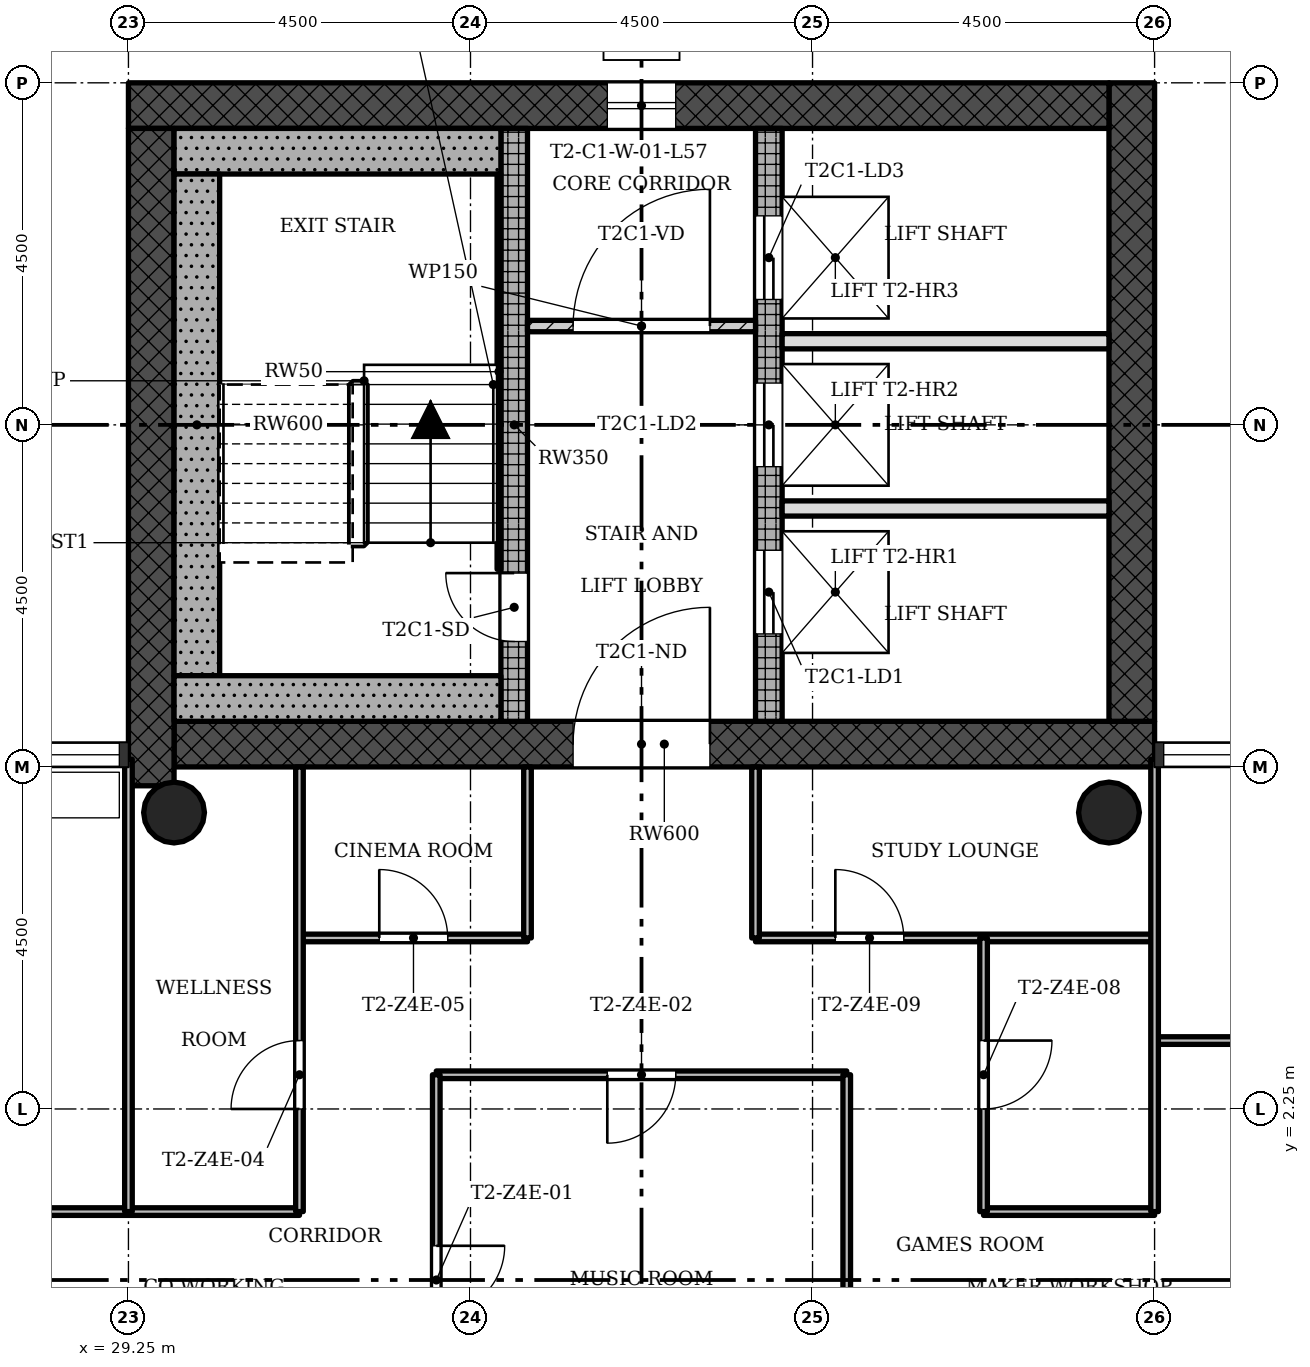
"""IFC4 building model, lengths in metres.
Left out: names, types, materials, properties, quantities, classifications, styles, units other than length and angle.
Written with IfcOpenShell. Run it as: python <this file> out.ifc"""

import sys

from ifc_helpers import new_model, si_unit, direction, frame, frame_2d, origin, origin_2d, place, context, subcontext, project, spatial, rectangle, hollow_circle, extrude, element, fill, save


model = new_model("IFC4")
c1 = context("Model", 3, precision=1e-05, world=origin(), true_north=direction((0.0, 1.0)))
c2 = subcontext(c1, "Body", "Model", "MODEL_VIEW")
j1 = project(units=[si_unit("LENGTHUNIT", "METRE"), si_unit("PLANEANGLEUNIT", "RADIAN")], contexts=[c1])
p1 = place(None, origin())
s1 = spatial("IfcSite", under=j1, at=p1, CompositionType="ELEMENT")
p2 = place(p1, origin())
s2 = spatial("IfcBuilding", under=s1, at=p2, CompositionType="ELEMENT")
p3 = place(p2, frame((0.0, 0.0, 206.2)))
s3 = spatial("IfcBuildingStorey", under=s2, at=p3, CompositionType="ELEMENT", Elevation=206.2)
p4 = place(p3, frame((29.85, 7.05, 0.0), z_axis=(0.0, 0.0, 1.0), x_axis=(1.0, 0.0, 0.0)))
e1 = element("IfcWall", 1, at=p4, inside=s3, PredefinedType="SHEAR", context=c2, shape_type="SweptSolid", body=[
    extrude(rectangle(XDim=12.9, YDim=0.6, at=frame_2d((6.45, 0.0))), origin(), (0.0, 0.0, 1.0), 3.4),
])
p5 = place(p4, frame((5.25, 0.0, 0.0)))
e2 = element("IfcOpeningElement", 2, at=p5, cuts=e1, PredefinedType="OPENING", context=c2, shape_type="SweptSolid", body=[
    extrude(rectangle(XDim=1.8, YDim=2.1, at=frame_2d((0.9, 1.05))), frame((0.0, 0.31, 0.0), z_axis=(0.0, -1.0, 0.0), x_axis=(1.0, 0.0, 0.0)), (0.0, 0.0, 1.0), 0.62),
])
p6 = place(p3, frame((42.45, 7.35, 0.0), z_axis=(0.0, 0.0, 1.0), x_axis=(0.0, 1.0, 0.0)))
e3 = element("IfcWall", 3, at=p6, inside=s3, PredefinedType="SHEAR", context=c2, shape_type="SweptSolid", body=[
    extrude(rectangle(XDim=8.4, YDim=0.6, at=frame_2d((4.2, 0.0))), origin(), (0.0, 0.0, 1.0), 3.4),
])
p7 = place(p3, frame((42.15, 15.45, 0.0), z_axis=(0.0, 0.0, 1.0), x_axis=(-1.0, 0.0, 0.0)))
e4 = element("IfcWall", 4, at=p7, inside=s3, PredefinedType="SHEAR", context=c2, shape_type="SweptSolid", body=[
    extrude(rectangle(XDim=12.9, YDim=0.6, at=frame_2d((6.45, 0.0))), origin(), (0.0, 0.0, 1.0), 3.4),
])
p8 = place(p7, frame((5.7, 0.0, 0.45)))
e5 = element("IfcOpeningElement", 5, at=p8, cuts=e4, PredefinedType="OPENING", context=c2, shape_type="SweptSolid", body=[
    extrude(rectangle(XDim=0.9, YDim=2.4, at=frame_2d((0.45, 1.2))), frame((0.0, 0.31, 0.0), z_axis=(0.0, -1.0, 0.0), x_axis=(1.0, 0.0, 0.0)), (0.0, 0.0, 1.0), 0.62),
])
p9 = place(p3, frame((29.55, 15.15, 0.0), z_axis=(0.0, 0.0, 1.0), x_axis=(0.0, -1.0, 0.0)))
e6 = element("IfcWall", 6, at=p9, inside=s3, PredefinedType="SHEAR", context=c2, shape_type="SweptSolid", body=[
    extrude(rectangle(XDim=8.648, YDim=0.6, at=frame_2d((4.324, 0.0))), origin(), (0.0, 0.0, 1.0), 3.4),
])
p10 = place(p3, frame((34.325, 7.35, 0.0), z_axis=(0.0, 0.0, 1.0), x_axis=(0.0, 1.0, 0.0)))
e7 = element("IfcWall", 7, at=p10, inside=s3, PredefinedType="SHEAR", context=c2, shape_type="SweptSolid", body=[
    extrude(rectangle(XDim=7.8, YDim=0.35, at=frame_2d((3.9, 0.0))), origin(), (0.0, 0.0, 1.0), 3.4),
])
p11 = place(p10, frame((1.05, 0.0, 0.0)))
e8 = element("IfcOpeningElement", 8, at=p11, cuts=e7, PredefinedType="OPENING", context=c2, shape_type="SweptSolid", body=[
    extrude(rectangle(XDim=0.9, YDim=2.1, at=frame_2d((0.45, 1.05))), frame((0.0, 0.185, 0.0), z_axis=(0.0, -1.0, 0.0), x_axis=(1.0, 0.0, 0.0)), (0.0, 0.0, 1.0), 0.37),
])
p12 = place(p3, frame((37.675, 7.35, 0.0), z_axis=(0.0, 0.0, 1.0), x_axis=(0.0, 1.0, 0.0)))
e9 = element("IfcWall", 9, at=p12, inside=s3, PredefinedType="SHEAR", context=c2, shape_type="SweptSolid", body=[
    extrude(rectangle(XDim=7.8, YDim=0.35, at=frame_2d((3.9, 0.0))), origin(), (0.0, 0.0, 1.0), 3.4),
])
p13 = place(p12, frame((1.15, 0.0, 0.0)))
e10 = element("IfcOpeningElement", 10, at=p13, cuts=e9, PredefinedType="OPENING", context=c2, shape_type="SweptSolid", body=[
    extrude(rectangle(XDim=1.1, YDim=2.1, at=frame_2d((0.55, 1.05))), frame((0.0, 0.185, 0.0), z_axis=(0.0, -1.0, 0.0), x_axis=(1.0, 0.0, 0.0)), (0.0, 0.0, 1.0), 0.37),
])
p14 = place(p12, frame((3.35, 0.0, 0.0)))
e11 = element("IfcOpeningElement", 11, at=p14, cuts=e9, PredefinedType="OPENING", context=c2, shape_type="SweptSolid", body=[
    extrude(rectangle(XDim=1.1, YDim=2.1, at=frame_2d((0.55, 1.05))), frame((0.0, 0.185, 0.0), z_axis=(0.0, -1.0, 0.0), x_axis=(1.0, 0.0, 0.0)), (0.0, 0.0, 1.0), 0.37),
])
p15 = place(p12, frame((5.55, 0.0, 0.0)))
e12 = element("IfcOpeningElement", 12, at=p15, cuts=e9, PredefinedType="OPENING", context=c2, shape_type="SweptSolid", body=[
    extrude(rectangle(XDim=1.1, YDim=2.1, at=frame_2d((0.55, 1.05))), frame((0.0, 0.185, 0.0), z_axis=(0.0, -1.0, 0.0), x_axis=(1.0, 0.0, 0.0)), (0.0, 0.0, 1.0), 0.37),
])
for number, where, z_axis, x_axis in (
    (13, (42.15, 6.15, 0.0), (0.0, 0.0, 1.0), (1.0, 0.0, 0.0)),
    (14, (29.85, 6.15, 0.0), (0.0, 0.0, 1.0), (1.0, 0.0, 0.0)),
):
    element("IfcColumn", number, at=place(p3, frame(where, z_axis=z_axis, x_axis=x_axis)), inside=s3, PredefinedType="COLUMN", context=c2, shape_type="SweptSolid", body=[
        extrude(hollow_circle(Radius=0.4, WallThickness=0.028, at=origin_2d()), origin(), (0.0, 0.0, 1.0), 3.4),
    ])
p16 = place(p3, frame((37.5, 12.55, 0.0), z_axis=(0.0, 0.0, 1.0), x_axis=(-1.0, 0.0, 0.0)))
e15 = element("IfcWall", 15, at=p16, inside=s3, PredefinedType="PARTITIONING", context=c2, shape_type="SweptSolid", body=[
    extrude(rectangle(XDim=3.0, YDim=0.15, at=frame_2d((1.5, 0.0))), origin(), (0.0, 0.0, 1.0), 3.0),
])
p17 = place(p16, frame((0.6, 0.0, 0.0)))
e16 = element("IfcOpeningElement", 16, at=p17, cuts=e15, PredefinedType="OPENING", context=c2, shape_type="SweptSolid", body=[
    extrude(rectangle(XDim=1.8, YDim=2.1, at=frame_2d((0.9, 1.05))), frame((0.0, 0.085, 0.0), z_axis=(0.0, -1.0, 0.0), x_axis=(1.0, 0.0, 0.0)), (0.0, 0.0, 1.0), 0.17),
])
for number, where, z_axis, x_axis in (
    (17, (42.15, 10.15, 0.0), (0.0, 0.0, 1.0), (-1.0, 0.0, 0.0)),
    (18, (42.15, 12.35, 0.0), (0.0, 0.0, 1.0), (-1.0, 0.0, 0.0)),
):
    element("IfcWall", number, at=place(p3, frame(where, z_axis=z_axis, x_axis=x_axis)), inside=s3, PredefinedType="SOLIDWALL", context=c2, shape_type="SweptSolid", body=[
        extrude(rectangle(XDim=4.3, YDim=0.2, at=frame_2d((2.15, 0.0))), origin(), (0.0, 0.0, 1.0), 3.0),
    ])
p18 = place(p3, frame((42.75, 0.9, 0.0), z_axis=(0.0, 0.0, 1.0), x_axis=(-1.0, 0.0, 0.0)))
e19 = element("IfcWall", 19, at=p18, inside=s3, PredefinedType="PARTITIONING", context=c2, shape_type="SweptSolid", body=[
    extrude(rectangle(XDim=2.25, YDim=0.1, at=frame_2d((1.125, 0.0))), origin(), (0.0, 0.0, 1.0), 3.0),
])
p19 = place(p3, frame((31.5, 0.9, 0.0), z_axis=(0.0, 0.0, 1.0), x_axis=(-1.0, 0.0, 0.0)))
e20 = element("IfcWall", 20, at=p19, inside=s3, PredefinedType="PARTITIONING", context=c2, shape_type="SweptSolid", body=[
    extrude(rectangle(XDim=6.75, YDim=0.1, at=frame_2d((3.375, 0.0))), origin(), (0.0, 0.0, 1.0), 3.0),
])
p20 = place(p19, frame((4.05, 0.0, 0.0)))
e21 = element("IfcOpeningElement", 21, at=p20, cuts=e20, PredefinedType="OPENING", context=c2, shape_type="SweptSolid", body=[
    extrude(rectangle(XDim=0.9, YDim=2.1, at=frame_2d((0.45, 1.05))), frame((0.0, 0.06, 0.0), z_axis=(0.0, -1.0, 0.0), x_axis=(1.0, 0.0, 0.0)), (0.0, 0.0, 1.0), 0.12),
])
p21 = place(p3, frame((38.7, 2.7, 0.0), z_axis=(0.0, 0.0, 1.0), x_axis=(-1.0, 0.0, 0.0)))
e22 = element("IfcWall", 22, at=p21, inside=s3, PredefinedType="PARTITIONING", context=c2, shape_type="SweptSolid", body=[
    extrude(rectangle(XDim=5.4, YDim=0.1, at=frame_2d((2.7, 0.0))), origin(), (0.0, 0.0, 1.0), 3.0),
])
p22 = place(p21, frame((2.25, 0.0, 0.0)))
e23 = element("IfcOpeningElement", 23, at=p22, cuts=e22, PredefinedType="OPENING", context=c2, shape_type="SweptSolid", body=[
    extrude(rectangle(XDim=0.9, YDim=2.1, at=frame_2d((0.45, 1.05))), frame((0.0, 0.06, 0.0), z_axis=(0.0, -1.0, 0.0), x_axis=(1.0, 0.0, 0.0)), (0.0, 0.0, 1.0), 0.12),
])
p23 = place(p3, frame((47.25, 3.15, 0.0), z_axis=(0.0, 0.0, 1.0), x_axis=(-1.0, 0.0, 0.0)))
e24 = element("IfcWall", 24, at=p23, inside=s3, PredefinedType="PARTITIONING", context=c2, shape_type="SweptSolid", body=[
    extrude(rectangle(XDim=4.5, YDim=0.1, at=frame_2d((2.25, 0.0))), origin(), (0.0, 0.0, 1.0), 3.0),
])
p24 = place(p23, frame((1.8, 0.0, 0.0)))
e25 = element("IfcOpeningElement", 25, at=p24, cuts=e24, PredefinedType="OPENING", context=c2, shape_type="SweptSolid", body=[
    extrude(rectangle(XDim=0.9, YDim=2.1, at=frame_2d((0.45, 1.05))), frame((0.0, 0.06, 0.0), z_axis=(0.0, -1.0, 0.0), x_axis=(1.0, 0.0, 0.0)), (0.0, 0.0, 1.0), 0.12),
])
p25 = place(p3, frame((42.75, 4.5, 0.0), z_axis=(0.0, 0.0, 1.0), x_axis=(-1.0, 0.0, 0.0)))
e26 = element("IfcWall", 26, at=p25, inside=s3, PredefinedType="PARTITIONING", context=c2, shape_type="SweptSolid", body=[
    extrude(rectangle(XDim=5.25, YDim=0.1, at=frame_2d((2.625, 0.0))), origin(), (0.0, 0.0, 1.0), 3.0),
])
p26 = place(p25, frame((3.3, 0.0, 0.0)))
e27 = element("IfcOpeningElement", 27, at=p26, cuts=e26, PredefinedType="OPENING", context=c2, shape_type="SweptSolid", body=[
    extrude(rectangle(XDim=0.9, YDim=2.1, at=frame_2d((0.45, 1.05))), frame((0.0, 0.06, 0.0), z_axis=(0.0, -1.0, 0.0), x_axis=(1.0, 0.0, 0.0)), (0.0, 0.0, 1.0), 0.12),
])
p27 = place(p3, frame((34.5, 4.5, 0.0), z_axis=(0.0, 0.0, 1.0), x_axis=(-1.0, 0.0, 0.0)))
e28 = element("IfcWall", 28, at=p27, inside=s3, PredefinedType="PARTITIONING", context=c2, shape_type="SweptSolid", body=[
    extrude(rectangle(XDim=3.0, YDim=0.1, at=frame_2d((1.5, 0.0))), origin(), (0.0, 0.0, 1.0), 3.0),
])
p28 = place(p27, frame((1.05, 0.0, 0.0)))
e29 = element("IfcOpeningElement", 29, at=p28, cuts=e28, PredefinedType="OPENING", context=c2, shape_type="SweptSolid", body=[
    extrude(rectangle(XDim=0.9, YDim=2.1, at=frame_2d((0.45, 1.05))), frame((0.0, 0.06, 0.0), z_axis=(0.0, -1.0, 0.0), x_axis=(1.0, 0.0, 0.0)), (0.0, 0.0, 1.0), 0.12),
])
p29 = place(p3, frame((42.75, 0.9, 0.0), z_axis=(0.0, 0.0, 1.0), x_axis=(0.0, 1.0, 0.0)))
e30 = element("IfcWall", 30, at=p29, inside=s3, PredefinedType="PARTITIONING", context=c2, shape_type="SweptSolid", body=[
    extrude(rectangle(XDim=5.95, YDim=0.1, at=frame_2d((2.975, 0.0))), origin(), (0.0, 0.0, 1.0), 3.0),
])
p30 = place(p3, frame((40.5, 0.9, 0.0), z_axis=(0.0, 0.0, 1.0), x_axis=(0.0, 1.0, 0.0)))
e31 = element("IfcWall", 31, at=p30, inside=s3, PredefinedType="PARTITIONING", context=c2, shape_type="SweptSolid", body=[
    extrude(rectangle(XDim=3.6, YDim=0.1, at=frame_2d((1.8, 0.0))), origin(), (0.0, 0.0, 1.0), 3.0),
])
p31 = place(p30, frame((1.35, 0.0, 0.0)))
e32 = element("IfcOpeningElement", 32, at=p31, cuts=e31, PredefinedType="OPENING", context=c2, shape_type="SweptSolid", body=[
    extrude(rectangle(XDim=0.9, YDim=2.1, at=frame_2d((0.45, 1.05))), frame((0.0, 0.06, 0.0), z_axis=(0.0, -1.0, 0.0), x_axis=(1.0, 0.0, 0.0)), (0.0, 0.0, 1.0), 0.12),
])
p32 = place(p3, frame((38.7, -2.7, 0.0), z_axis=(0.0, 0.0, 1.0), x_axis=(0.0, 1.0, 0.0)))
e33 = element("IfcWall", 33, at=p32, inside=s3, PredefinedType="PARTITIONING", context=c2, shape_type="SweptSolid", body=[
    extrude(rectangle(XDim=5.4, YDim=0.1, at=frame_2d((2.7, 0.0))), origin(), (0.0, 0.0, 1.0), 3.0),
])
for number, where, z_axis, x_axis in (
    (34, (37.5, 4.5, 0.0), (0.0, 0.0, 1.0), (0.0, 1.0, 0.0)),
    (35, (34.5, 4.5, 0.0), (0.0, 0.0, 1.0), (0.0, 1.0, 0.0)),
):
    element("IfcWall", number, at=place(p3, frame(where, z_axis=z_axis, x_axis=x_axis)), inside=s3, PredefinedType="PARTITIONING", context=c2, shape_type="SweptSolid", body=[
        extrude(rectangle(XDim=2.25, YDim=0.1, at=frame_2d((1.125, 0.0))), origin(), (0.0, 0.0, 1.0), 3.0),
    ])
p33 = place(p3, frame((33.3, -2.7, 0.0), z_axis=(0.0, 0.0, 1.0), x_axis=(0.0, 1.0, 0.0)))
e36 = element("IfcWall", 36, at=p33, inside=s3, PredefinedType="PARTITIONING", context=c2, shape_type="SweptSolid", body=[
    extrude(rectangle(XDim=5.4, YDim=0.1, at=frame_2d((2.7, 0.0))), origin(), (0.0, 0.0, 1.0), 3.0),
])
p34 = place(p33, frame((2.25, 0.0, 0.0)))
e37 = element("IfcOpeningElement", 37, at=p34, cuts=e36, PredefinedType="OPENING", context=c2, shape_type="SweptSolid", body=[
    extrude(rectangle(XDim=0.9, YDim=2.1, at=frame_2d((0.45, 1.05))), frame((0.0, 0.06, 0.0), z_axis=(0.0, -1.0, 0.0), x_axis=(1.0, 0.0, 0.0)), (0.0, 0.0, 1.0), 0.12),
])
p35 = place(p3, frame((31.5, 0.9, 0.0), z_axis=(0.0, 0.0, 1.0), x_axis=(0.0, 1.0, 0.0)))
e38 = element("IfcWall", 38, at=p35, inside=s3, PredefinedType="PARTITIONING", context=c2, shape_type="SweptSolid", body=[
    extrude(rectangle(XDim=5.85, YDim=0.1, at=frame_2d((2.925, 0.0))), origin(), (0.0, 0.0, 1.0), 3.0),
])
p36 = place(p35, frame((1.35, 0.0, 0.0)))
e39 = element("IfcOpeningElement", 39, at=p36, cuts=e38, PredefinedType="OPENING", context=c2, shape_type="SweptSolid", body=[
    extrude(rectangle(XDim=0.9, YDim=2.1, at=frame_2d((0.45, 1.05))), frame((0.0, 0.06, 0.0), z_axis=(0.0, -1.0, 0.0), x_axis=(1.0, 0.0, 0.0)), (0.0, 0.0, 1.0), 0.12),
])
p37 = place(p3, frame((29.25, 0.9, 0.0), z_axis=(0.0, 0.0, 1.0), x_axis=(0.0, 1.0, 0.0)))
e40 = element("IfcWall", 40, at=p37, inside=s3, PredefinedType="PARTITIONING", context=c2, shape_type="SweptSolid", body=[
    extrude(rectangle(XDim=5.95, YDim=0.1, at=frame_2d((2.975, 0.0))), origin(), (0.0, 0.0, 1.0), 3.0),
])
p38 = place(p3, frame((34.15, 14.85, 0.0), z_axis=(0.0, 0.0, 1.0), x_axis=(-1.0, 0.0, 0.0)))
e41 = element("IfcWall", 41, at=p38, inside=s3, PredefinedType="SHEAR", context=c2, shape_type="SweptSolid", body=[
    extrude(rectangle(XDim=4.3, YDim=0.6, at=frame_2d((2.15, 0.0))), origin(), (0.0, 0.0, 1.0), 3.4),
])
p39 = place(p3, frame((30.15, 7.95, 0.0), z_axis=(0.0, 0.0, 1.0), x_axis=(0.0, 1.0, 0.0)))
e42 = element("IfcWall", 42, at=p39, inside=s3, PredefinedType="SHEAR", context=c2, shape_type="SweptSolid", body=[
    extrude(rectangle(XDim=6.6, YDim=0.6, at=frame_2d((3.3, 0.0))), origin(), (0.0, 0.0, 1.0), 3.4),
])
p40 = place(p3, frame((34.15, 7.65, 0.0), z_axis=(0.0, 0.0, 1.0), x_axis=(-1.0, 0.0, 0.0)))
e43 = element("IfcWall", 43, at=p40, inside=s3, PredefinedType="SHEAR", context=c2, shape_type="SweptSolid", body=[
    extrude(rectangle(XDim=4.3, YDim=0.6, at=frame_2d((2.15, 0.0))), origin(), (0.0, 0.0, 1.0), 3.4),
])
p41 = place(p3, frame((34.125, 9.35, 0.0), z_axis=(0.0, 0.0, 1.0), x_axis=(0.0, 1.0, 0.0)))
e44 = element("IfcWall", 44, at=p41, inside=s3, PredefinedType="SHEAR", context=c2, shape_type="SweptSolid", body=[
    extrude(rectangle(XDim=5.2, YDim=0.05, at=frame_2d((2.6, 0.0))), origin(), (0.0, 0.0, 1.0), 3.4),
])
p42 = place(p8, origin())
e45 = element("IfcWindow", 45, at=p42, inside=s3, PartitioningType="SINGLE_PANEL", PredefinedType="WINDOW", context=c2, shape_type="SweptSolid", body=[
    extrude(rectangle(XDim=0.9, YDim=2.4, at=frame_2d((0.45, 1.2))), frame((0.0, 0.03, 0.0), z_axis=(0.0, -1.0, 0.0), x_axis=(1.0, 0.0, 0.0)), (0.0, 0.0, 1.0), 0.06),
])
fill(e5, e45)
p43 = place(p17, origin())
e46 = element("IfcDoor", 46, at=p43, inside=s3, OperationType="SINGLE_SWING_LEFT", PredefinedType="DOOR", context=c2, shape_type="SweptSolid", body=[
    extrude(rectangle(XDim=1.8, YDim=2.1, at=frame_2d((0.9, 1.05))), frame((0.0, 0.025, 0.0), z_axis=(0.0, -1.0, 0.0), x_axis=(1.0, 0.0, 0.0)), (0.0, 0.0, 1.0), 0.05),
])
fill(e16, e46)
p44 = place(p34, origin())
e47 = element("IfcDoor", 47, at=p44, inside=s3, OperationType="SINGLE_SWING_RIGHT", PredefinedType="DOOR", context=c2, shape_type="SweptSolid", body=[
    extrude(rectangle(XDim=0.9, YDim=2.1, at=frame_2d((0.45, 1.05))), frame((0.0, 0.025, 0.0), z_axis=(0.0, -1.0, 0.0), x_axis=(1.0, 0.0, 0.0)), (0.0, 0.0, 1.0), 0.05),
])
fill(e37, e47)
p45 = place(p22, origin())
e48 = element("IfcDoor", 48, at=p45, inside=s3, OperationType="SINGLE_SWING_LEFT", PredefinedType="DOOR", context=c2, shape_type="SweptSolid", body=[
    extrude(rectangle(XDim=0.9, YDim=2.1, at=frame_2d((0.45, 1.05))), frame((0.0, 0.025, 0.0), z_axis=(0.0, -1.0, 0.0), x_axis=(1.0, 0.0, 0.0)), (0.0, 0.0, 1.0), 0.05),
])
fill(e23, e48)
p46 = place(p36, origin())
e49 = element("IfcDoor", 49, at=p46, inside=s3, OperationType="SINGLE_SWING_RIGHT", PredefinedType="DOOR", context=c2, shape_type="SweptSolid", body=[
    extrude(rectangle(XDim=0.9, YDim=2.1, at=frame_2d((0.45, 1.05))), frame((0.0, 0.025, 0.0), z_axis=(0.0, -1.0, 0.0), x_axis=(1.0, 0.0, 0.0)), (0.0, 0.0, 1.0), 0.05),
])
fill(e39, e49)
p47 = place(p28, origin())
e50 = element("IfcDoor", 50, at=p47, inside=s3, OperationType="SINGLE_SWING_RIGHT", PredefinedType="DOOR", context=c2, shape_type="SweptSolid", body=[
    extrude(rectangle(XDim=0.9, YDim=2.1, at=frame_2d((0.45, 1.05))), frame((0.0, 0.025, 0.0), z_axis=(0.0, -1.0, 0.0), x_axis=(1.0, 0.0, 0.0)), (0.0, 0.0, 1.0), 0.05),
])
fill(e29, e50)
p48 = place(p31, origin())
e51 = element("IfcDoor", 51, at=p48, inside=s3, OperationType="SINGLE_SWING_RIGHT", PredefinedType="DOOR", context=c2, shape_type="SweptSolid", body=[
    extrude(rectangle(XDim=0.9, YDim=2.1, at=frame_2d((0.45, 1.05))), frame((0.0, 0.025, 0.0), z_axis=(0.0, -1.0, 0.0), x_axis=(1.0, 0.0, 0.0)), (0.0, 0.0, 1.0), 0.05),
])
fill(e32, e51)
p49 = place(p26, origin())
e52 = element("IfcDoor", 52, at=p49, inside=s3, OperationType="SINGLE_SWING_RIGHT", PredefinedType="DOOR", context=c2, shape_type="SweptSolid", body=[
    extrude(rectangle(XDim=0.9, YDim=2.1, at=frame_2d((0.45, 1.05))), frame((0.0, 0.025, 0.0), z_axis=(0.0, -1.0, 0.0), x_axis=(1.0, 0.0, 0.0)), (0.0, 0.0, 1.0), 0.05),
])
fill(e27, e52)
p50 = place(p11, origin())
e53 = element("IfcDoor", 53, at=p50, inside=s3, OperationType="SINGLE_SWING_LEFT", PredefinedType="DOOR", context=c2, shape_type="SweptSolid", body=[
    extrude(rectangle(XDim=0.9, YDim=2.1, at=frame_2d((0.45, 1.05))), frame((0.0, 0.025, 0.0), z_axis=(0.0, -1.0, 0.0), x_axis=(1.0, 0.0, 0.0)), (0.0, 0.0, 1.0), 0.05),
])
fill(e8, e53)
p51 = place(p13, origin())
e54 = element("IfcDoor", 54, at=p51, inside=s3, OperationType="SLIDING_TO_LEFT", PredefinedType="DOOR", context=c2, shape_type="SweptSolid", body=[
    extrude(rectangle(XDim=1.1, YDim=2.1, at=frame_2d((0.55, 1.05))), frame((0.0, 0.025, 0.0), z_axis=(0.0, -1.0, 0.0), x_axis=(1.0, 0.0, 0.0)), (0.0, 0.0, 1.0), 0.05),
])
fill(e10, e54)
p52 = place(p14, origin())
e55 = element("IfcDoor", 55, at=p52, inside=s3, OperationType="SLIDING_TO_LEFT", PredefinedType="DOOR", context=c2, shape_type="SweptSolid", body=[
    extrude(rectangle(XDim=1.1, YDim=2.1, at=frame_2d((0.55, 1.05))), frame((0.0, 0.025, 0.0), z_axis=(0.0, -1.0, 0.0), x_axis=(1.0, 0.0, 0.0)), (0.0, 0.0, 1.0), 0.05),
])
fill(e11, e55)
p53 = place(p15, origin())
e56 = element("IfcDoor", 56, at=p53, inside=s3, OperationType="SLIDING_TO_LEFT", PredefinedType="DOOR", context=c2, shape_type="SweptSolid", body=[
    extrude(rectangle(XDim=1.1, YDim=2.1, at=frame_2d((0.55, 1.05))), frame((0.0, 0.025, 0.0), z_axis=(0.0, -1.0, 0.0), x_axis=(1.0, 0.0, 0.0)), (0.0, 0.0, 1.0), 0.05),
])
fill(e12, e56)
p54 = place(p5, origin())
e57 = element("IfcDoor", 57, at=p54, inside=s3, OperationType="SINGLE_SWING_LEFT", PredefinedType="DOOR", context=c2, shape_type="SweptSolid", body=[
    extrude(rectangle(XDim=1.8, YDim=2.1, at=frame_2d((0.9, 1.05))), frame((0.0, 0.025, 0.0), z_axis=(0.0, -1.0, 0.0), x_axis=(1.0, 0.0, 0.0)), (0.0, 0.0, 1.0), 0.05),
])
fill(e2, e57)
save(model, sys.argv[1])
